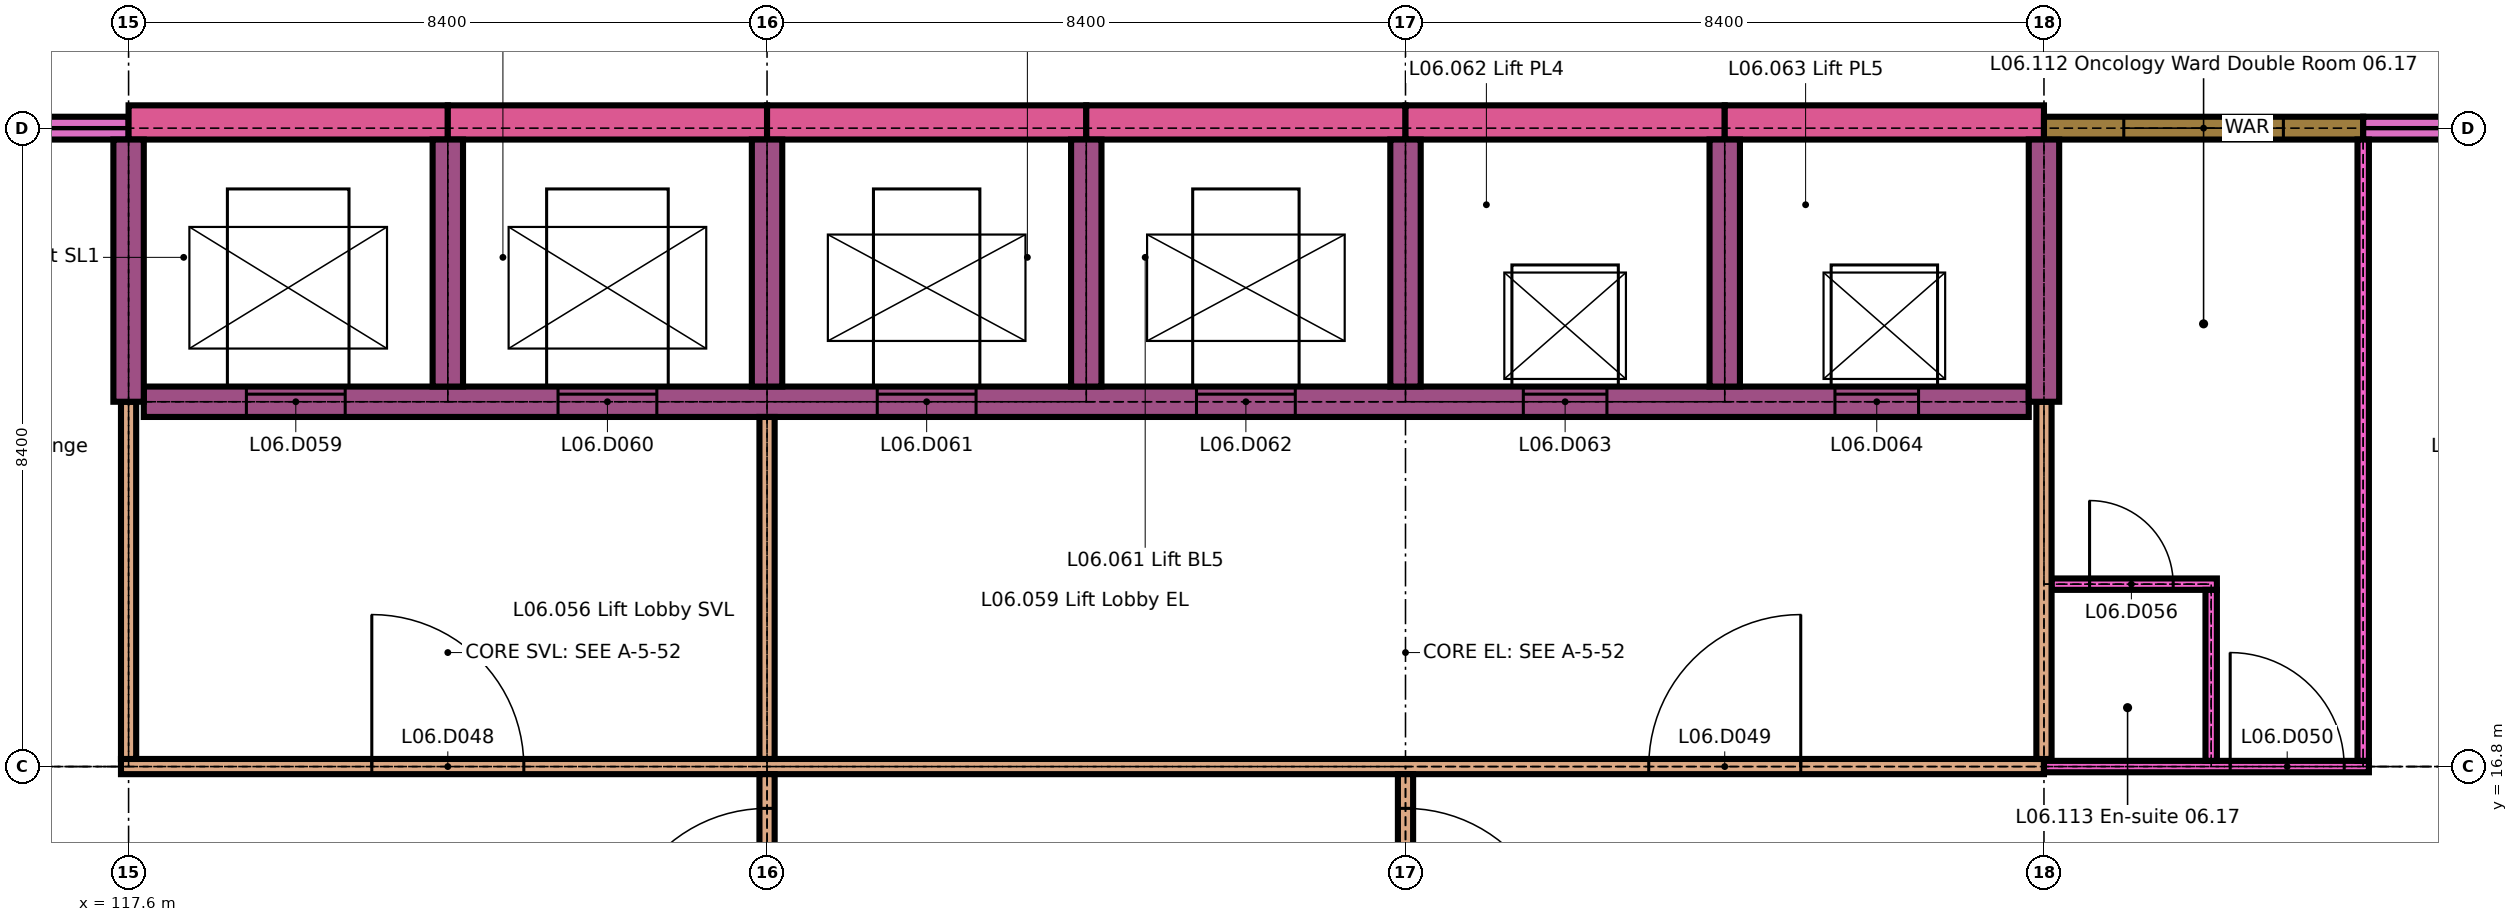
"""IFC4 building model, lengths in metres.
Left out: names, types, materials, properties, quantities, classifications, styles, units other than length and angle.
Written with IfcOpenShell. Run it as: python <this file> out.ifc"""

import sys

from ifc_helpers import new_model, si_unit, direction, frame, frame_2d, origin, place, context, subcontext, project, spatial, rectangle, extrude, element, fill, save


model = new_model("IFC4")
c1 = context("Model", 3, precision=1e-05, world=origin(), true_north=direction((0.0, 1.0)))
c2 = subcontext(c1, "Body", "Model", "MODEL_VIEW")
j1 = project(units=[si_unit("LENGTHUNIT", "METRE"), si_unit("PLANEANGLEUNIT", "RADIAN")], contexts=[c1])
p1 = place(None, origin())
s1 = spatial("IfcSite", under=j1, at=p1, CompositionType="ELEMENT")
p2 = place(p1, origin())
s2 = spatial("IfcBuilding", under=s1, at=p2, CompositionType="ELEMENT")
p3 = place(p2, frame((0.0, 0.0, 26.1)))
s3 = spatial("IfcBuildingStorey", under=s2, at=p3, CompositionType="ELEMENT", Elevation=26.1)
p4 = place(p3, frame((113.4, 25.2, 0.0), z_axis=(0.0, 0.0, 1.0), x_axis=(1.0, 0.0, 0.0)))
e1 = element("IfcWall", 1, at=p4, inside=s3, PredefinedType="SOLIDWALL", context=c2, shape_type="SweptSolid", body=[
    extrude(rectangle(XDim=4.2, YDim=0.3, at=frame_2d((2.1, 0.0))), origin(), (0.0, 0.0, 1.0), 0.6),
])
for number, where, z_axis, x_axis in (
    (2, (117.6, 25.275, 0.0), (0.0, 0.0, 1.0), (1.0, 0.0, 0.0)),
    (3, (121.8, 25.275, 0.0), (0.0, 0.0, 1.0), (1.0, 0.0, 0.0)),
    (4, (126.0, 25.275, 0.0), (0.0, 0.0, 1.0), (1.0, 0.0, 0.0)),
    (5, (130.2, 25.275, 0.0), (0.0, 0.0, 1.0), (1.0, 0.0, 0.0)),
):
    element("IfcWall", number, at=place(p3, frame(where, z_axis=z_axis, x_axis=x_axis)), inside=s3, PredefinedType="SOLIDWALL", context=c2, shape_type="SweptSolid", body=[
        extrude(rectangle(XDim=4.2, YDim=0.45, at=frame_2d((2.1, 0.0))), origin(), (0.0, 0.0, 1.0), 3.3),
    ])
p5 = place(p3, frame((134.4, 25.275, 0.0), z_axis=(0.0, 0.0, 1.0), x_axis=(1.0, 0.0, 0.0)))
e6 = element("IfcWall", 6, at=p5, inside=s3, PredefinedType="SOLIDWALL", context=c2, shape_type="SweptSolid", body=[
    extrude(rectangle(XDim=4.2, YDim=0.45, at=frame_2d((2.1, 0.0))), origin(), (0.0, 0.0, 1.0), 3.3),
])
p6 = place(p3, frame((138.6, 25.275, 0.0), z_axis=(0.0, 0.0, 1.0), x_axis=(1.0, 0.0, 0.0)))
e7 = element("IfcWall", 7, at=p6, inside=s3, PredefinedType="SOLIDWALL", context=c2, shape_type="SweptSolid", body=[
    extrude(rectangle(XDim=4.2, YDim=0.45, at=frame_2d((2.1, 0.0))), origin(), (0.0, 0.0, 1.0), 3.3),
])
p7 = place(p3, frame((142.8, 25.2, 0.0), z_axis=(0.0, 0.0, 1.0), x_axis=(1.0, 0.0, 0.0)))
e8 = element("IfcWall", 8, at=p7, inside=s3, PredefinedType="SOLIDWALL", context=c2, shape_type="SweptSolid", body=[
    extrude(rectangle(XDim=4.2, YDim=0.3, at=frame_2d((2.1, 0.0))), origin(), (0.0, 0.0, 1.0), 2.9),
])
p8 = place(p7, frame((1.05, 0.0, 0.9)))
e9 = element("IfcOpeningElement", 9, at=p8, cuts=e8, PredefinedType="OPENING", context=c2, shape_type="SweptSolid", body=[
    extrude(rectangle(XDim=2.1, YDim=1.5, at=frame_2d((1.05, 0.75))), frame((0.0, 0.16, 0.0), z_axis=(0.0, -1.0, 0.0), x_axis=(1.0, 0.0, 0.0)), (0.0, 0.0, 1.0), 0.32),
])
p9 = place(p3, frame((147.0, 25.2, 0.0), z_axis=(0.0, 0.0, 1.0), x_axis=(1.0, 0.0, 0.0)))
e10 = element("IfcWall", 10, at=p9, inside=s3, PredefinedType="SOLIDWALL", context=c2, shape_type="SweptSolid", body=[
    extrude(rectangle(XDim=3.85, YDim=0.3, at=frame_2d((1.925, 0.0))), origin(), (0.0, 0.0, 1.0), 0.6),
])
p10 = place(p3, frame((117.5, 16.8, 0.0), z_axis=(0.0, 0.0, 1.0), x_axis=(1.0, 0.0, 0.0)))
e11 = element("IfcWall", 11, at=p10, inside=s3, PredefinedType="PARTITIONING", context=c2, shape_type="SweptSolid", body=[
    extrude(rectangle(XDim=25.3, YDim=0.2, at=frame_2d((12.65, 0.0))), origin(), (0.0, 0.0, 1.0), 3.3),
])
p11 = place(p10, frame((3.3, 0.0, 0.0)))
e12 = element("IfcOpeningElement", 12, at=p11, cuts=e11, PredefinedType="OPENING", context=c2, shape_type="SweptSolid", body=[
    extrude(rectangle(XDim=2.0, YDim=2.4, at=frame_2d((1.0, 1.2))), frame((0.0, 0.11, 0.0), z_axis=(0.0, -1.0, 0.0), x_axis=(1.0, 0.0, 0.0)), (0.0, 0.0, 1.0), 0.22),
])
p12 = place(p10, frame((20.1, 0.0, 0.0)))
e13 = element("IfcOpeningElement", 13, at=p12, cuts=e11, PredefinedType="OPENING", context=c2, shape_type="SweptSolid", body=[
    extrude(rectangle(XDim=2.0, YDim=2.4, at=frame_2d((1.0, 1.2))), frame((0.0, 0.11, 0.0), z_axis=(0.0, -1.0, 0.0), x_axis=(1.0, 0.0, 0.0)), (0.0, 0.0, 1.0), 0.22),
])
p13 = place(p3, frame((142.8, 16.8, 0.0), z_axis=(0.0, 0.0, 1.0), x_axis=(1.0, 0.0, 0.0)))
e14 = element("IfcWall", 14, at=p13, inside=s3, PredefinedType="PARTITIONING", context=c2, shape_type="SweptSolid", body=[
    extrude(rectangle(XDim=4.275, YDim=0.15, at=frame_2d((2.137, 0.0))), origin(), (0.0, 0.0, 1.0), 3.3),
])
p14 = place(p13, frame((2.45, 0.0, 0.0)))
e15 = element("IfcOpeningElement", 15, at=p14, cuts=e14, PredefinedType="OPENING", context=c2, shape_type="SweptSolid", body=[
    extrude(rectangle(XDim=1.5, YDim=2.4, at=frame_2d((0.75, 1.2))), frame((0.0, 0.085, 0.0), z_axis=(0.0, -1.0, 0.0), x_axis=(1.0, 0.0, 0.0)), (0.0, 0.0, 1.0), 0.17),
])
p15 = place(p3, frame((142.9, 19.2, 0.0), z_axis=(0.0, 0.0, 1.0), x_axis=(1.0, 0.0, 0.0)))
e16 = element("IfcWall", 16, at=p15, inside=s3, PredefinedType="PARTITIONING", context=c2, shape_type="SweptSolid", body=[
    extrude(rectangle(XDim=2.175, YDim=0.15, at=frame_2d((1.087, 0.0))), origin(), (0.0, 0.0, 1.0), 3.3),
])
p16 = place(p15, frame((0.5, 0.0, 0.0)))
e17 = element("IfcOpeningElement", 17, at=p16, cuts=e16, PredefinedType="OPENING", context=c2, shape_type="SweptSolid", body=[
    extrude(rectangle(XDim=1.1, YDim=2.1, at=frame_2d((0.55, 1.05))), frame((0.0, 0.085, 0.0), z_axis=(0.0, -1.0, 0.0), x_axis=(1.0, 0.0, 0.0)), (0.0, 0.0, 1.0), 0.17),
])
p17 = place(p3, frame((117.8, 21.6, 0.0), z_axis=(0.0, 0.0, 1.0), x_axis=(1.0, 0.0, 0.0)))
e18 = element("IfcWall", 18, at=p17, inside=s3, PredefinedType="SHEAR", context=c2, shape_type="SweptSolid", body=[
    extrude(rectangle(XDim=24.8, YDim=0.4, at=frame_2d((12.4, 0.0))), origin(), (0.0, 0.0, 1.0), 3.3),
])
p18 = place(p17, frame((1.35, 0.0, 0.0)))
e19 = element("IfcOpeningElement", 19, at=p18, cuts=e18, PredefinedType="OPENING", context=c2, shape_type="SweptSolid", body=[
    extrude(rectangle(XDim=1.3, YDim=2.1, at=frame_2d((0.65, 1.05))), frame((0.0, 0.21, 0.0), z_axis=(0.0, -1.0, 0.0), x_axis=(1.0, 0.0, 0.0)), (0.0, 0.0, 1.0), 0.42),
])
p19 = place(p17, frame((5.45, 0.0, 0.0)))
e20 = element("IfcOpeningElement", 20, at=p19, cuts=e18, PredefinedType="OPENING", context=c2, shape_type="SweptSolid", body=[
    extrude(rectangle(XDim=1.3, YDim=2.1, at=frame_2d((0.65, 1.05))), frame((0.0, 0.21, 0.0), z_axis=(0.0, -1.0, 0.0), x_axis=(1.0, 0.0, 0.0)), (0.0, 0.0, 1.0), 0.42),
])
p20 = place(p17, frame((9.65, 0.0, 0.0)))
e21 = element("IfcOpeningElement", 21, at=p20, cuts=e18, PredefinedType="OPENING", context=c2, shape_type="SweptSolid", body=[
    extrude(rectangle(XDim=1.3, YDim=2.1, at=frame_2d((0.65, 1.05))), frame((0.0, 0.21, 0.0), z_axis=(0.0, -1.0, 0.0), x_axis=(1.0, 0.0, 0.0)), (0.0, 0.0, 1.0), 0.42),
])
p21 = place(p17, frame((13.85, 0.0, 0.0)))
e22 = element("IfcOpeningElement", 22, at=p21, cuts=e18, PredefinedType="OPENING", context=c2, shape_type="SweptSolid", body=[
    extrude(rectangle(XDim=1.3, YDim=2.1, at=frame_2d((0.65, 1.05))), frame((0.0, 0.21, 0.0), z_axis=(0.0, -1.0, 0.0), x_axis=(1.0, 0.0, 0.0)), (0.0, 0.0, 1.0), 0.42),
])
p22 = place(p17, frame((18.15, 0.0, 0.0)))
e23 = element("IfcOpeningElement", 23, at=p22, cuts=e18, PredefinedType="OPENING", context=c2, shape_type="SweptSolid", body=[
    extrude(rectangle(XDim=1.1, YDim=2.1, at=frame_2d((0.55, 1.05))), frame((0.0, 0.21, 0.0), z_axis=(0.0, -1.0, 0.0), x_axis=(1.0, 0.0, 0.0)), (0.0, 0.0, 1.0), 0.42),
])
p23 = place(p17, frame((22.25, 0.0, 0.0)))
e24 = element("IfcOpeningElement", 24, at=p23, cuts=e18, PredefinedType="OPENING", context=c2, shape_type="SweptSolid", body=[
    extrude(rectangle(XDim=1.1, YDim=2.1, at=frame_2d((0.55, 1.05))), frame((0.0, 0.21, 0.0), z_axis=(0.0, -1.0, 0.0), x_axis=(1.0, 0.0, 0.0)), (0.0, 0.0, 1.0), 0.42),
])
p24 = place(p3, frame((117.6, 16.9, 0.0), z_axis=(0.0, 0.0, 1.0), x_axis=(0.0, 1.0, 0.0)))
e25 = element("IfcWall", 25, at=p24, inside=s3, PredefinedType="PARTITIONING", context=c2, shape_type="SweptSolid", body=[
    extrude(rectangle(XDim=4.7, YDim=0.2, at=frame_2d((2.35, 0.0))), origin(), (0.0, 0.0, 1.0), 3.3),
])
p25 = place(p3, frame((117.6, 21.6, 0.0), z_axis=(0.0, 0.0, 1.0), x_axis=(0.0, 1.0, 0.0)))
e26 = element("IfcWall", 26, at=p25, inside=s3, PredefinedType="SHEAR", context=c2, shape_type="SweptSolid", body=[
    extrude(rectangle(XDim=3.45, YDim=0.4, at=frame_2d((1.725, 0.0))), origin(), (0.0, 0.0, 1.0), 3.3),
])
p26 = place(p3, frame((121.8, 21.8, 0.0), z_axis=(0.0, 0.0, 1.0), x_axis=(0.0, 1.0, 0.0)))
e27 = element("IfcWall", 27, at=p26, inside=s3, PredefinedType="SHEAR", context=c2, shape_type="SweptSolid", body=[
    extrude(rectangle(XDim=3.25, YDim=0.4, at=frame_2d((1.625, 0.0))), origin(), (0.0, 0.0, 1.0), 3.3),
])
p27 = place(p3, frame((126.0, 8.775, 0.0), z_axis=(0.0, 0.0, 1.0), x_axis=(0.0, 1.0, 0.0)))
e28 = element("IfcWall", 28, at=p27, inside=s3, PredefinedType="PARTITIONING", context=c2, shape_type="SweptSolid", body=[
    extrude(rectangle(XDim=7.925, YDim=0.2, at=frame_2d((3.962, 0.0))), origin(), (0.0, 0.0, 1.0), 3.3),
])
p28 = place(p27, frame((0.312, 0.0, 0.0)))
e29 = element("IfcOpeningElement", 29, at=p28, cuts=e28, PredefinedType="OPENING", context=c2, shape_type="SweptSolid", body=[
    extrude(rectangle(XDim=2.0, YDim=2.4, at=frame_2d((1.0, 1.2))), frame((0.0, 0.11, 0.0), z_axis=(0.0, -1.0, 0.0), x_axis=(1.0, 0.0, 0.0)), (0.0, 0.0, 1.0), 0.22),
])
p29 = place(p27, frame((5.475, 0.0, 0.0)))
e30 = element("IfcOpeningElement", 30, at=p29, cuts=e28, PredefinedType="OPENING", context=c2, shape_type="SweptSolid", body=[
    extrude(rectangle(XDim=2.0, YDim=2.4, at=frame_2d((1.0, 1.2))), frame((0.0, 0.11, 0.0), z_axis=(0.0, -1.0, 0.0), x_axis=(1.0, 0.0, 0.0)), (0.0, 0.0, 1.0), 0.22),
])
p30 = place(p3, frame((126.0, 16.9, 0.0), z_axis=(0.0, 0.0, 1.0), x_axis=(0.0, 1.0, 0.0)))
e31 = element("IfcWall", 31, at=p30, inside=s3, PredefinedType="PARTITIONING", context=c2, shape_type="SweptSolid", body=[
    extrude(rectangle(XDim=4.5, YDim=0.2, at=frame_2d((2.25, 0.0))), origin(), (0.0, 0.0, 1.0), 3.3),
])
for number, where, z_axis, x_axis in (
    (32, (126.0, 21.8, 0.0), (0.0, 0.0, 1.0), (0.0, 1.0, 0.0)),
    (33, (130.2, 21.8, 0.0), (0.0, 0.0, 1.0), (0.0, 1.0, 0.0)),
):
    element("IfcWall", number, at=place(p3, frame(where, z_axis=z_axis, x_axis=x_axis)), inside=s3, PredefinedType="SHEAR", context=c2, shape_type="SweptSolid", body=[
        extrude(rectangle(XDim=3.25, YDim=0.4, at=frame_2d((1.625, 0.0))), origin(), (0.0, 0.0, 1.0), 3.3),
    ])
p31 = place(p3, frame((134.4, 3.6, 0.0), z_axis=(0.0, 0.0, 1.0), x_axis=(0.0, 1.0, 0.0)))
e34 = element("IfcWall", 34, at=p31, inside=s3, PredefinedType="PARTITIONING", context=c2, shape_type="SweptSolid", body=[
    extrude(rectangle(XDim=13.1, YDim=0.2, at=frame_2d((6.55, 0.0))), origin(), (0.0, 0.0, 1.0), 3.3),
])
p32 = place(p31, frame((5.3, 0.0, 0.0)))
e35 = element("IfcOpeningElement", 35, at=p32, cuts=e34, PredefinedType="OPENING", context=c2, shape_type="SweptSolid", body=[
    extrude(rectangle(XDim=2.0, YDim=2.4, at=frame_2d((1.0, 1.2))), frame((0.0, 0.11, 0.0), z_axis=(0.0, -1.0, 0.0), x_axis=(1.0, 0.0, 0.0)), (0.0, 0.0, 1.0), 0.22),
])
p33 = place(p31, frame((10.65, 0.0, 0.0)))
e36 = element("IfcOpeningElement", 36, at=p33, cuts=e34, PredefinedType="OPENING", context=c2, shape_type="SweptSolid", body=[
    extrude(rectangle(XDim=2.0, YDim=2.4, at=frame_2d((1.0, 1.2))), frame((0.0, 0.11, 0.0), z_axis=(0.0, -1.0, 0.0), x_axis=(1.0, 0.0, 0.0)), (0.0, 0.0, 1.0), 0.22),
])
for number, where, z_axis, x_axis in (
    (37, (134.4, 21.8, 0.0), (0.0, 0.0, 1.0), (0.0, 1.0, 0.0)),
    (38, (138.6, 21.8, 0.0), (0.0, 0.0, 1.0), (0.0, 1.0, 0.0)),
):
    element("IfcWall", number, at=place(p3, frame(where, z_axis=z_axis, x_axis=x_axis)), inside=s3, PredefinedType="SHEAR", context=c2, shape_type="SweptSolid", body=[
        extrude(rectangle(XDim=3.25, YDim=0.4, at=frame_2d((1.625, 0.0))), origin(), (0.0, 0.0, 1.0), 3.3),
    ])
p34 = place(p3, frame((142.8, 16.9, 0.0), z_axis=(0.0, 0.0, 1.0), x_axis=(0.0, 1.0, 0.0)))
e39 = element("IfcWall", 39, at=p34, inside=s3, PredefinedType="PARTITIONING", context=c2, shape_type="SweptSolid", body=[
    extrude(rectangle(XDim=4.7, YDim=0.2, at=frame_2d((2.35, 0.0))), origin(), (0.0, 0.0, 1.0), 3.3),
])
p35 = place(p3, frame((142.8, 21.6, 0.0), z_axis=(0.0, 0.0, 1.0), x_axis=(0.0, 1.0, 0.0)))
e40 = element("IfcWall", 40, at=p35, inside=s3, PredefinedType="SHEAR", context=c2, shape_type="SweptSolid", body=[
    extrude(rectangle(XDim=3.45, YDim=0.4, at=frame_2d((1.725, 0.0))), origin(), (0.0, 0.0, 1.0), 3.3),
])
p36 = place(p3, frame((145.0, 16.875, 0.0), z_axis=(0.0, 0.0, 1.0), x_axis=(0.0, 1.0, 0.0)))
e41 = element("IfcWall", 41, at=p36, inside=s3, PredefinedType="PARTITIONING", context=c2, shape_type="SweptSolid", body=[
    extrude(rectangle(XDim=2.25, YDim=0.15, at=frame_2d((1.125, 0.0))), origin(), (0.0, 0.0, 1.0), 3.3),
])
p37 = place(p3, frame((147.0, 16.875, 0.0), z_axis=(0.0, 0.0, 1.0), x_axis=(0.0, 1.0, 0.0)))
e42 = element("IfcWall", 42, at=p37, inside=s3, PredefinedType="PARTITIONING", context=c2, shape_type="SweptSolid", body=[
    extrude(rectangle(XDim=8.175, YDim=0.15, at=frame_2d((4.087, 0.0))), origin(), (0.0, 0.0, 1.0), 3.3),
])
p38 = place(p8, origin())
e43 = element("IfcWindow", 43, at=p38, inside=s3, PartitioningType="DOUBLE_PANEL_VERTICAL", PredefinedType="WINDOW", context=c2, shape_type="SweptSolid", body=[
    extrude(rectangle(XDim=2.1, YDim=1.5, at=frame_2d((1.05, 0.75))), frame((0.0, 0.05, 0.0), z_axis=(0.0, -1.0, 0.0), x_axis=(1.0, 0.0, 0.0)), (0.0, 0.0, 1.0), 0.1),
])
fill(e9, e43)
p39 = place(p11, origin())
e44 = element("IfcDoor", 44, at=p39, inside=s3, OperationType="SINGLE_SWING_RIGHT", PredefinedType="DOOR", context=c2, shape_type="SweptSolid", body=[
    extrude(rectangle(XDim=2.0, YDim=2.4, at=frame_2d((1.0, 1.2))), frame((0.0, 0.03, 0.0), z_axis=(0.0, -1.0, 0.0), x_axis=(1.0, 0.0, 0.0)), (0.0, 0.0, 1.0), 0.06),
])
fill(e12, e44)
p40 = place(p12, origin())
e45 = element("IfcDoor", 45, at=p40, inside=s3, OperationType="SINGLE_SWING_LEFT", PredefinedType="DOOR", context=c2, shape_type="SweptSolid", body=[
    extrude(rectangle(XDim=2.0, YDim=2.4, at=frame_2d((1.0, 1.2))), frame((0.0, 0.03, 0.0), z_axis=(0.0, -1.0, 0.0), x_axis=(1.0, 0.0, 0.0)), (0.0, 0.0, 1.0), 0.06),
])
fill(e13, e45)
p41 = place(p14, origin())
e46 = element("IfcDoor", 46, at=p41, inside=s3, OperationType="SINGLE_SWING_RIGHT", PredefinedType="DOOR", context=c2, shape_type="SweptSolid", body=[
    extrude(rectangle(XDim=1.5, YDim=2.4, at=frame_2d((0.75, 1.2))), frame((0.0, 0.03, 0.0), z_axis=(0.0, -1.0, 0.0), x_axis=(1.0, 0.0, 0.0)), (0.0, 0.0, 1.0), 0.06),
])
fill(e15, e46)
p42 = place(p16, origin())
e47 = element("IfcDoor", 47, at=p42, inside=s3, OperationType="SINGLE_SWING_RIGHT", PredefinedType="DOOR", context=c2, shape_type="SweptSolid", body=[
    extrude(rectangle(XDim=1.1, YDim=2.1, at=frame_2d((0.55, 1.05))), frame((0.0, 0.025, 0.0), z_axis=(0.0, -1.0, 0.0), x_axis=(1.0, 0.0, 0.0)), (0.0, 0.0, 1.0), 0.05),
])
fill(e17, e47)
p43 = place(p18, origin())
e48 = element("IfcDoor", 48, at=p43, inside=s3, OperationType="SLIDING_TO_LEFT", PredefinedType="DOOR", context=c2, shape_type="SweptSolid", body=[
    extrude(rectangle(XDim=1.3, YDim=2.1, at=frame_2d((0.65, 1.05))), frame((0.0, 0.025, 0.0), z_axis=(0.0, -1.0, 0.0), x_axis=(1.0, 0.0, 0.0)), (0.0, 0.0, 1.0), 0.05),
])
fill(e19, e48)
p44 = place(p19, origin())
e49 = element("IfcDoor", 49, at=p44, inside=s3, OperationType="SLIDING_TO_LEFT", PredefinedType="DOOR", context=c2, shape_type="SweptSolid", body=[
    extrude(rectangle(XDim=1.3, YDim=2.1, at=frame_2d((0.65, 1.05))), frame((0.0, 0.025, 0.0), z_axis=(0.0, -1.0, 0.0), x_axis=(1.0, 0.0, 0.0)), (0.0, 0.0, 1.0), 0.05),
])
fill(e20, e49)
p45 = place(p20, origin())
e50 = element("IfcDoor", 50, at=p45, inside=s3, OperationType="SLIDING_TO_LEFT", PredefinedType="DOOR", context=c2, shape_type="SweptSolid", body=[
    extrude(rectangle(XDim=1.3, YDim=2.1, at=frame_2d((0.65, 1.05))), frame((0.0, 0.025, 0.0), z_axis=(0.0, -1.0, 0.0), x_axis=(1.0, 0.0, 0.0)), (0.0, 0.0, 1.0), 0.05),
])
fill(e21, e50)
p46 = place(p21, origin())
e51 = element("IfcDoor", 51, at=p46, inside=s3, OperationType="SLIDING_TO_LEFT", PredefinedType="DOOR", context=c2, shape_type="SweptSolid", body=[
    extrude(rectangle(XDim=1.3, YDim=2.1, at=frame_2d((0.65, 1.05))), frame((0.0, 0.025, 0.0), z_axis=(0.0, -1.0, 0.0), x_axis=(1.0, 0.0, 0.0)), (0.0, 0.0, 1.0), 0.05),
])
fill(e22, e51)
p47 = place(p22, origin())
e52 = element("IfcDoor", 52, at=p47, inside=s3, OperationType="SLIDING_TO_LEFT", PredefinedType="DOOR", context=c2, shape_type="SweptSolid", body=[
    extrude(rectangle(XDim=1.1, YDim=2.1, at=frame_2d((0.55, 1.05))), frame((0.0, 0.025, 0.0), z_axis=(0.0, -1.0, 0.0), x_axis=(1.0, 0.0, 0.0)), (0.0, 0.0, 1.0), 0.05),
])
fill(e23, e52)
p48 = place(p23, origin())
e53 = element("IfcDoor", 53, at=p48, inside=s3, OperationType="SLIDING_TO_LEFT", PredefinedType="DOOR", context=c2, shape_type="SweptSolid", body=[
    extrude(rectangle(XDim=1.1, YDim=2.1, at=frame_2d((0.55, 1.05))), frame((0.0, 0.025, 0.0), z_axis=(0.0, -1.0, 0.0), x_axis=(1.0, 0.0, 0.0)), (0.0, 0.0, 1.0), 0.05),
])
fill(e24, e53)
p49 = place(p29, origin())
e54 = element("IfcDoor", 54, at=p49, inside=s3, OperationType="SINGLE_SWING_RIGHT", PredefinedType="DOOR", context=c2, shape_type="SweptSolid", body=[
    extrude(rectangle(XDim=2.0, YDim=2.4, at=frame_2d((1.0, 1.2))), frame((0.0, 0.03, 0.0), z_axis=(0.0, -1.0, 0.0), x_axis=(1.0, 0.0, 0.0)), (0.0, 0.0, 1.0), 0.06),
])
fill(e30, e54)
p50 = place(p33, origin())
e55 = element("IfcDoor", 55, at=p50, inside=s3, OperationType="SINGLE_SWING_LEFT", PredefinedType="DOOR", context=c2, shape_type="SweptSolid", body=[
    extrude(rectangle(XDim=2.0, YDim=2.4, at=frame_2d((1.0, 1.2))), frame((0.0, 0.03, 0.0), z_axis=(0.0, -1.0, 0.0), x_axis=(1.0, 0.0, 0.0)), (0.0, 0.0, 1.0), 0.06),
])
fill(e36, e55)
save(model, sys.argv[1])
